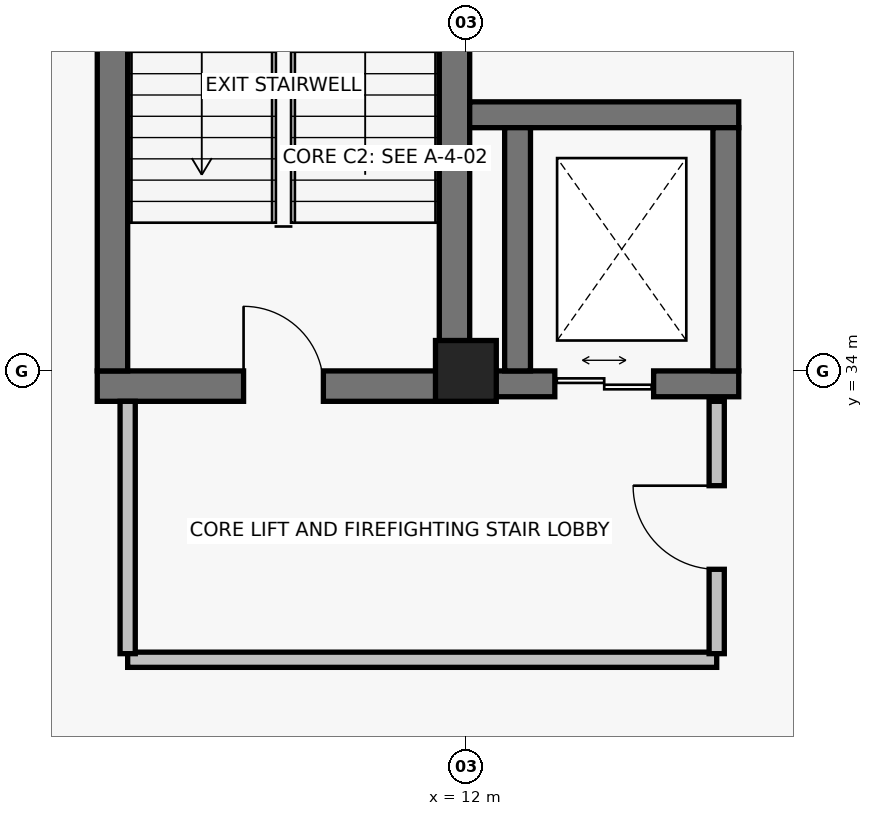
"""IFC4 building model, lengths in metres.
Left out: names, types, materials, properties, quantities, classifications, styles, units other than length and angle.
Written with IfcOpenShell. Run it as: python <this file> out.ifc"""

import sys

from ifc_helpers import new_model, si_unit, direction, frame, frame_2d, origin, origin_2d, place, context, subcontext, project, spatial, rectangle, extrude, element, fill, save


model = new_model("IFC4")
c1 = context("Model", 3, precision=1e-05, world=origin(), true_north=direction((0.0, 1.0)))
c2 = subcontext(c1, "Body", "Model", "MODEL_VIEW")
j1 = project(units=[si_unit("LENGTHUNIT", "METRE"), si_unit("PLANEANGLEUNIT", "RADIAN")], contexts=[c1])
p1 = place(None, origin())
s1 = spatial("IfcSite", under=j1, at=p1, CompositionType="ELEMENT")
p2 = place(p1, origin())
s2 = spatial("IfcBuilding", under=s1, at=p2, CompositionType="ELEMENT")
p3 = place(p2, frame((0.0, 0.0, -10.4)))
s3 = spatial("IfcBuildingStorey", under=s2, at=p3, CompositionType="ELEMENT", Elevation=-10.4)
p4 = place(p3, frame((12.0, 34.0, 0.0), z_axis=(0.0, 0.0, 1.0), x_axis=(1.0, 0.0, 0.0)))
e1 = element("IfcColumn", 1, at=p4, inside=s3, PredefinedType="COLUMN", context=c2, shape_type="SweptSolid", body=[
    extrude(rectangle(XDim=0.8, YDim=0.8, at=origin_2d()), origin(), (0.0, 0.0, 1.0), 5.6),
])
p5 = place(p3, frame((7.15, 33.8, 0.0), z_axis=(0.0, 0.0, 1.0), x_axis=(1.0, 0.0, 0.0)))
e2 = element("IfcWall", 2, at=p5, inside=s3, PredefinedType="SHEAR", context=c2, shape_type="SweptSolid", body=[
    extrude(rectangle(XDim=4.9, YDim=0.4, at=frame_2d((2.45, 0.0))), origin(), (0.0, 0.0, 1.0), 5.15),
])
p6 = place(p5, frame((1.925, 0.0, 0.0)))
e3 = element("IfcOpeningElement", 3, at=p6, cuts=e2, PredefinedType="OPENING", context=c2, shape_type="SweptSolid", body=[
    extrude(rectangle(XDim=1.05, YDim=2.15, at=frame_2d((0.525, 1.075))), frame((0.0, 0.215, 0.0), z_axis=(0.0, -1.0, 0.0), x_axis=(1.0, 0.0, 0.0)), (0.0, 0.0, 1.0), 0.43),
])
for number, where, z_axis, x_axis in (
    (4, (7.35, 43.4, 0.0), (0.0, 0.0, 1.0), (0.0, -1.0, 0.0)),
    (5, (11.85, 34.0, 0.0), (0.0, 0.0, 1.0), (0.0, 1.0, 0.0)),
):
    element("IfcWall", number, at=place(p3, frame(where, z_axis=z_axis, x_axis=x_axis)), inside=s3, PredefinedType="SHEAR", context=c2, shape_type="SweptSolid", body=[
        extrude(rectangle(XDim=9.4, YDim=0.4, at=frame_2d((4.7, 0.0))), origin(), (0.0, 0.0, 1.0), 5.15),
    ])
p7 = place(p3, frame((12.05, 33.83, 0.0), z_axis=(0.0, 0.0, 1.0), x_axis=(1.0, 0.0, 0.0)))
e6 = element("IfcWall", 6, at=p7, inside=s3, PredefinedType="SHEAR", context=c2, shape_type="SweptSolid", body=[
    extrude(rectangle(XDim=3.54, YDim=0.34, at=frame_2d((1.77, 0.0))), origin(), (0.0, 0.0, 1.0), 5.15),
])
p8 = place(p7, frame((1.12, 0.0, 0.0)))
e7 = element("IfcOpeningElement", 7, at=p8, cuts=e6, PredefinedType="OPENING", context=c2, shape_type="SweptSolid", body=[
    extrude(rectangle(XDim=1.3, YDim=2.25, at=frame_2d((0.65, 1.125))), frame((0.0, 0.185, 0.0), z_axis=(0.0, -1.0, 0.0), x_axis=(1.0, 0.0, 0.0)), (0.0, 0.0, 1.0), 0.37),
])
p9 = place(p3, frame((15.59, 37.37, 0.0), z_axis=(0.0, 0.0, 1.0), x_axis=(-1.0, 0.0, 0.0)))
e8 = element("IfcWall", 8, at=p9, inside=s3, PredefinedType="SHEAR", context=c2, shape_type="SweptSolid", body=[
    extrude(rectangle(XDim=3.54, YDim=0.34, at=frame_2d((1.77, 0.0))), origin(), (0.0, 0.0, 1.0), 5.15),
])
for number, where, z_axis, x_axis in (
    (9, (12.68, 37.2, 0.0), (0.0, 0.0, 1.0), (0.0, -1.0, 0.0)),
    (10, (15.42, 34.0, 0.0), (0.0, 0.0, 1.0), (0.0, 1.0, 0.0)),
):
    element("IfcWall", number, at=place(p3, frame(where, z_axis=z_axis, x_axis=x_axis)), inside=s3, PredefinedType="SHEAR", context=c2, shape_type="SweptSolid", body=[
        extrude(rectangle(XDim=3.2, YDim=0.34, at=frame_2d((1.6, 0.0))), origin(), (0.0, 0.0, 1.0), 5.15),
    ])
p10 = place(p3, frame((7.55, 30.2, 0.0), z_axis=(0.0, 0.0, 1.0), x_axis=(1.0, 0.0, 0.0)))
e11 = element("IfcWall", 11, at=p10, inside=s3, PredefinedType="PARTITIONING", context=c2, shape_type="SweptSolid", body=[
    extrude(rectangle(XDim=7.75, YDim=0.2, at=frame_2d((3.875, 0.0))), origin(), (0.0, 0.0, 1.0), 4.68),
])
p11 = place(p3, frame((7.55, 33.6, 0.0), z_axis=(0.0, 0.0, 1.0), x_axis=(0.0, -1.0, 0.0)))
e12 = element("IfcWall", 12, at=p11, inside=s3, PredefinedType="PARTITIONING", context=c2, shape_type="SweptSolid", body=[
    extrude(rectangle(XDim=3.32, YDim=0.2, at=frame_2d((1.66, 0.0))), origin(), (0.0, 0.0, 1.0), 5.15),
])
p12 = place(p3, frame((15.3, 30.28, 0.0), z_axis=(0.0, 0.0, 1.0), x_axis=(0.0, 1.0, 0.0)))
e13 = element("IfcWall", 13, at=p12, inside=s3, PredefinedType="PARTITIONING", context=c2, shape_type="SweptSolid", body=[
    extrude(rectangle(XDim=3.32, YDim=0.2, at=frame_2d((1.66, 0.0))), origin(), (0.0, 0.0, 1.0), 5.15),
])
p13 = place(p12, frame((1.11, 0.0, 0.0)))
e14 = element("IfcOpeningElement", 14, at=p13, cuts=e13, PredefinedType="OPENING", context=c2, shape_type="SweptSolid", body=[
    extrude(rectangle(XDim=1.1, YDim=2.15, at=frame_2d((0.55, 1.075))), frame((0.0, 0.115, 0.0), z_axis=(0.0, -1.0, 0.0), x_axis=(1.0, 0.0, 0.0)), (0.0, 0.0, 1.0), 0.23),
])
p14 = place(p6, origin())
e15 = element("IfcDoor", 15, at=p14, inside=s3, OperationType="SINGLE_SWING_LEFT", PredefinedType="DOOR", context=c2, shape_type="SweptSolid", body=[
    extrude(rectangle(XDim=1.05, YDim=2.15, at=frame_2d((0.525, 1.075))), frame((0.0, 0.025, 0.0), z_axis=(0.0, -1.0, 0.0), x_axis=(1.0, 0.0, 0.0)), (0.0, 0.0, 1.0), 0.05),
])
fill(e3, e15)
p15 = place(p8, origin())
e16 = element("IfcDoor", 16, at=p15, inside=s3, OperationType="DOUBLE_DOOR_SLIDING", PredefinedType="DOOR", context=c2, shape_type="SweptSolid", body=[
    extrude(rectangle(XDim=1.3, YDim=2.25, at=frame_2d((0.65, 1.125))), frame((0.0, 0.025, 0.0), z_axis=(0.0, -1.0, 0.0), x_axis=(1.0, 0.0, 0.0)), (0.0, 0.0, 1.0), 0.05),
])
fill(e7, e16)
p16 = place(p13, origin())
e17 = element("IfcDoor", 17, at=p16, inside=s3, OperationType="SINGLE_SWING_RIGHT", PredefinedType="DOOR", context=c2, shape_type="SweptSolid", body=[
    extrude(rectangle(XDim=1.1, YDim=2.15, at=frame_2d((0.55, 1.075))), frame((0.0, 0.025, 0.0), z_axis=(0.0, -1.0, 0.0), x_axis=(1.0, 0.0, 0.0)), (0.0, 0.0, 1.0), 0.05),
])
fill(e14, e17)
save(model, sys.argv[1])
